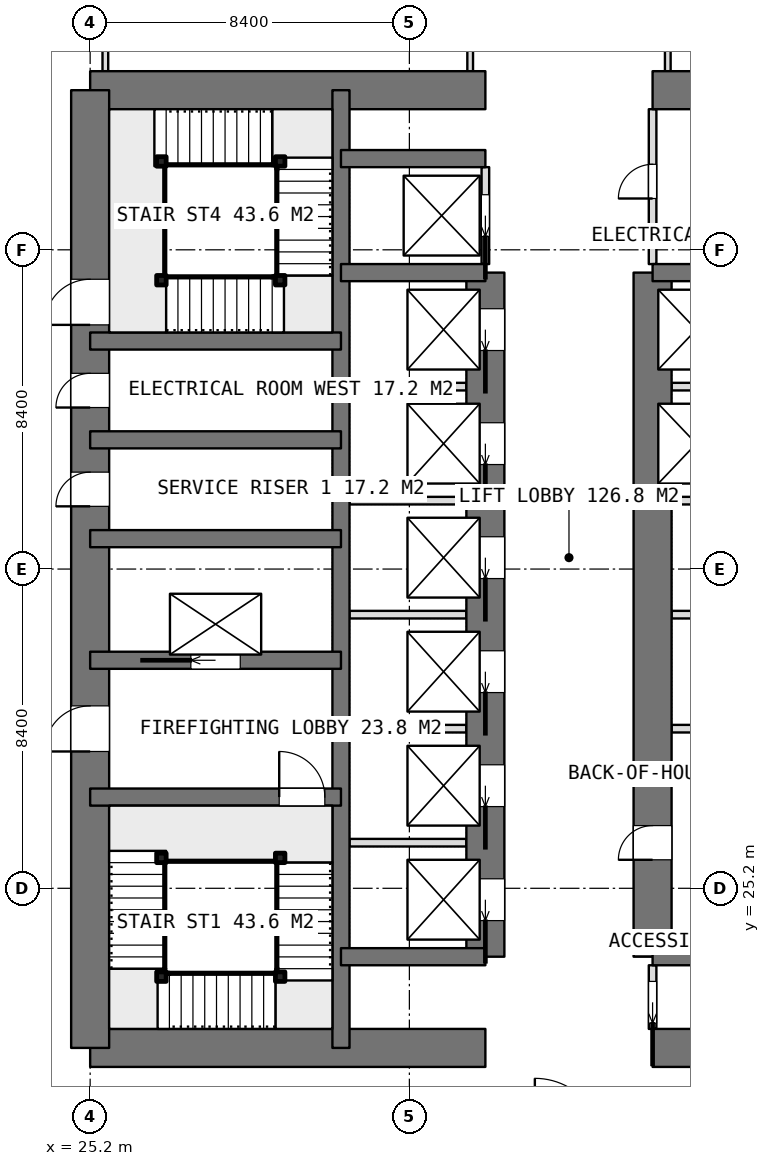
"""IFC4 building model, lengths in metres.
Left out: names, types, materials, properties, quantities, classifications, styles, units other than length and angle.
Written with IfcOpenShell. Run it as: python <this file> out.ifc"""

import sys

from ifc_helpers import new_model, si_unit, direction, frame, frame_2d, origin, origin_2d, place, context, subcontext, project, spatial, rectangle, extrude, element, fill, save


model = new_model("IFC4")
c1 = context("Model", 3, precision=1e-05, world=origin(), true_north=direction((0.0, 1.0)))
c2 = subcontext(c1, "Body", "Model", "MODEL_VIEW")
j1 = project(units=[si_unit("LENGTHUNIT", "METRE"), si_unit("PLANEANGLEUNIT", "RADIAN")], contexts=[c1])
p1 = place(None, origin())
s1 = spatial("IfcSite", under=j1, at=p1, CompositionType="ELEMENT")
p2 = place(p1, origin())
s2 = spatial("IfcBuilding", under=s1, at=p2, CompositionType="ELEMENT")
p3 = place(p2, frame((0.0, 0.0, 172.7)))
s3 = spatial("IfcBuildingStorey", under=s2, at=p3, CompositionType="ELEMENT", Elevation=172.7)
p4 = place(p3, frame((25.2, 21.0, 0.0), z_axis=(0.0, 0.0, 1.0), x_axis=(1.0, 0.0, 0.0)))
e1 = element("IfcWall", 1, at=p4, inside=s3, PredefinedType="SHEAR", context=c2, shape_type="SweptSolid", body=[
    extrude(rectangle(XDim=10.4, YDim=1.0, at=frame_2d((5.2, 0.0))), origin(), (0.0, 0.0, 1.0), 3.75),
])
p5 = place(p3, frame((40.0, 21.0, 0.0), z_axis=(0.0, 0.0, 1.0), x_axis=(1.0, 0.0, 0.0)))
e2 = element("IfcWall", 2, at=p5, inside=s3, PredefinedType="SHEAR", context=c2, shape_type="SweptSolid", body=[
    extrude(rectangle(XDim=10.4, YDim=1.0, at=frame_2d((5.2, 0.0))), origin(), (0.0, 0.0, 1.0), 3.75),
])
p6 = place(p3, frame((25.2, 46.2, 0.0), z_axis=(0.0, 0.0, 1.0), x_axis=(1.0, 0.0, 0.0)))
e3 = element("IfcWall", 3, at=p6, inside=s3, PredefinedType="SHEAR", context=c2, shape_type="SweptSolid", body=[
    extrude(rectangle(XDim=10.4, YDim=1.0, at=frame_2d((5.2, 0.0))), origin(), (0.0, 0.0, 1.0), 3.75),
])
p7 = place(p3, frame((40.0, 46.2, 0.0), z_axis=(0.0, 0.0, 1.0), x_axis=(1.0, 0.0, 0.0)))
e4 = element("IfcWall", 4, at=p7, inside=s3, PredefinedType="SHEAR", context=c2, shape_type="SweptSolid", body=[
    extrude(rectangle(XDim=10.4, YDim=1.0, at=frame_2d((5.2, 0.0))), origin(), (0.0, 0.0, 1.0), 3.75),
])
p8 = place(p3, frame((25.2, 21.0, 0.0), z_axis=(0.0, 0.0, 1.0), x_axis=(0.0, 1.0, 0.0)))
e5 = element("IfcWall", 5, at=p8, inside=s3, PredefinedType="SHEAR", context=c2, shape_type="SweptSolid", body=[
    extrude(rectangle(XDim=25.2, YDim=1.0, at=frame_2d((12.6, 0.0))), origin(), (0.0, 0.0, 1.0), 3.75),
])
p9 = place(p8, frame((7.8, 0.0, 0.0)))
e6 = element("IfcOpeningElement", 6, at=p9, cuts=e5, PredefinedType="OPENING", context=c2, shape_type="SweptSolid", body=[
    extrude(rectangle(XDim=1.2, YDim=2.1, at=frame_2d((0.6, 1.05))), frame((0.0, 0.51, 0.0), z_axis=(0.0, -1.0, 0.0), x_axis=(1.0, 0.0, 0.0)), (0.0, 0.0, 1.0), 1.02),
])
p10 = place(p8, frame((14.25, 0.0, 0.0)))
e7 = element("IfcOpeningElement", 7, at=p10, cuts=e5, PredefinedType="OPENING", context=c2, shape_type="SweptSolid", body=[
    extrude(rectangle(XDim=0.9, YDim=2.1, at=frame_2d((0.45, 1.05))), frame((0.0, 0.51, 0.0), z_axis=(0.0, -1.0, 0.0), x_axis=(1.0, 0.0, 0.0)), (0.0, 0.0, 1.0), 1.02),
])
p11 = place(p8, frame((16.85, 0.0, 0.0)))
e8 = element("IfcOpeningElement", 8, at=p11, cuts=e5, PredefinedType="OPENING", context=c2, shape_type="SweptSolid", body=[
    extrude(rectangle(XDim=0.9, YDim=2.1, at=frame_2d((0.45, 1.05))), frame((0.0, 0.51, 0.0), z_axis=(0.0, -1.0, 0.0), x_axis=(1.0, 0.0, 0.0)), (0.0, 0.0, 1.0), 1.02),
])
p12 = place(p8, frame((19.025, 0.0, 0.0)))
e9 = element("IfcOpeningElement", 9, at=p12, cuts=e5, PredefinedType="OPENING", context=c2, shape_type="SweptSolid", body=[
    extrude(rectangle(XDim=1.2, YDim=2.1, at=frame_2d((0.6, 1.05))), frame((0.0, 0.51, 0.0), z_axis=(0.0, -1.0, 0.0), x_axis=(1.0, 0.0, 0.0)), (0.0, 0.0, 1.0), 1.02),
])
p13 = place(p3, frame((31.8, 21.0, 0.0), z_axis=(0.0, 0.0, 1.0), x_axis=(0.0, 1.0, 0.0)))
e10 = element("IfcWall", 10, at=p13, inside=s3, PredefinedType="SHEAR", context=c2, shape_type="SweptSolid", body=[
    extrude(rectangle(XDim=25.2, YDim=0.45, at=frame_2d((12.6, 0.0))), origin(), (0.0, 0.0, 1.0), 3.75),
])
p14 = place(p3, frame((35.6, 23.4, 0.0), z_axis=(0.0, 0.0, 1.0), x_axis=(0.0, 1.0, 0.0)))
e11 = element("IfcWall", 11, at=p14, inside=s3, PredefinedType="SHEAR", context=c2, shape_type="SweptSolid", body=[
    extrude(rectangle(XDim=18.0, YDim=1.0, at=frame_2d((9.0, 0.0))), origin(), (0.0, 0.0, 1.0), 3.75),
])
p15 = place(p14, frame((0.95, 0.0, 0.0)))
e12 = element("IfcOpeningElement", 12, at=p15, cuts=e11, PredefinedType="OPENING", context=c2, shape_type="SweptSolid", body=[
    extrude(rectangle(XDim=1.1, YDim=2.1, at=frame_2d((0.55, 1.05))), frame((0.0, 0.51, 0.0), z_axis=(0.0, -1.0, 0.0), x_axis=(1.0, 0.0, 0.0)), (0.0, 0.0, 1.0), 1.02),
])
p16 = place(p14, frame((3.95, 0.0, 0.0)))
e13 = element("IfcOpeningElement", 13, at=p16, cuts=e11, PredefinedType="OPENING", context=c2, shape_type="SweptSolid", body=[
    extrude(rectangle(XDim=1.1, YDim=2.1, at=frame_2d((0.55, 1.05))), frame((0.0, 0.51, 0.0), z_axis=(0.0, -1.0, 0.0), x_axis=(1.0, 0.0, 0.0)), (0.0, 0.0, 1.0), 1.02),
])
p17 = place(p14, frame((6.95, 0.0, 0.0)))
e14 = element("IfcOpeningElement", 14, at=p17, cuts=e11, PredefinedType="OPENING", context=c2, shape_type="SweptSolid", body=[
    extrude(rectangle(XDim=1.1, YDim=2.1, at=frame_2d((0.55, 1.05))), frame((0.0, 0.51, 0.0), z_axis=(0.0, -1.0, 0.0), x_axis=(1.0, 0.0, 0.0)), (0.0, 0.0, 1.0), 1.02),
])
p18 = place(p14, frame((9.95, 0.0, 0.0)))
e15 = element("IfcOpeningElement", 15, at=p18, cuts=e11, PredefinedType="OPENING", context=c2, shape_type="SweptSolid", body=[
    extrude(rectangle(XDim=1.1, YDim=2.1, at=frame_2d((0.55, 1.05))), frame((0.0, 0.51, 0.0), z_axis=(0.0, -1.0, 0.0), x_axis=(1.0, 0.0, 0.0)), (0.0, 0.0, 1.0), 1.02),
])
p19 = place(p14, frame((12.95, 0.0, 0.0)))
e16 = element("IfcOpeningElement", 16, at=p19, cuts=e11, PredefinedType="OPENING", context=c2, shape_type="SweptSolid", body=[
    extrude(rectangle(XDim=1.1, YDim=2.1, at=frame_2d((0.55, 1.05))), frame((0.0, 0.51, 0.0), z_axis=(0.0, -1.0, 0.0), x_axis=(1.0, 0.0, 0.0)), (0.0, 0.0, 1.0), 1.02),
])
p20 = place(p14, frame((15.95, 0.0, 0.0)))
e17 = element("IfcOpeningElement", 17, at=p20, cuts=e11, PredefinedType="OPENING", context=c2, shape_type="SweptSolid", body=[
    extrude(rectangle(XDim=1.1, YDim=2.1, at=frame_2d((0.55, 1.05))), frame((0.0, 0.51, 0.0), z_axis=(0.0, -1.0, 0.0), x_axis=(1.0, 0.0, 0.0)), (0.0, 0.0, 1.0), 1.02),
])
p21 = place(p3, frame((40.0, 23.4, 0.0), z_axis=(0.0, 0.0, 1.0), x_axis=(0.0, 1.0, 0.0)))
e18 = element("IfcWall", 18, at=p21, inside=s3, PredefinedType="SHEAR", context=c2, shape_type="SweptSolid", body=[
    extrude(rectangle(XDim=18.0, YDim=1.0, at=frame_2d((9.0, 0.0))), origin(), (0.0, 0.0, 1.0), 3.75),
])
p22 = place(p21, frame((2.55, 0.0, 0.0)))
e19 = element("IfcOpeningElement", 19, at=p22, cuts=e18, PredefinedType="OPENING", context=c2, shape_type="SweptSolid", body=[
    extrude(rectangle(XDim=0.9, YDim=2.1, at=frame_2d((0.45, 1.05))), frame((0.0, 0.51, 0.0), z_axis=(0.0, -1.0, 0.0), x_axis=(1.0, 0.0, 0.0)), (0.0, 0.0, 1.0), 1.02),
])
for number, where, z_axis, x_axis in (
    (20, (31.8, 23.4, 0.0), (0.0, 0.0, 1.0), (1.0, 0.0, 0.0)),
    (21, (31.8, 41.4, 0.0), (0.0, 0.0, 1.0), (1.0, 0.0, 0.0)),
    (22, (31.8, 44.4, 0.0), (0.0, 0.0, 1.0), (1.0, 0.0, 0.0)),
    (23, (40.0, 23.4, 0.0), (0.0, 0.0, 1.0), (1.0, 0.0, 0.0)),
    (24, (40.0, 41.4, 0.0), (0.0, 0.0, 1.0), (1.0, 0.0, 0.0)),
):
    element("IfcWall", number, at=place(p3, frame(where, z_axis=z_axis, x_axis=x_axis)), inside=s3, PredefinedType="SHEAR", context=c2, shape_type="SweptSolid", body=[
        extrude(rectangle(XDim=3.8, YDim=0.45, at=frame_2d((1.9, 0.0))), origin(), (0.0, 0.0, 1.0), 3.75),
    ])
p23 = place(p3, frame((25.2, 27.6, 0.0), z_axis=(0.0, 0.0, 1.0), x_axis=(1.0, 0.0, 0.0)))
e25 = element("IfcWall", 25, at=p23, inside=s3, PredefinedType="SHEAR", context=c2, shape_type="SweptSolid", body=[
    extrude(rectangle(XDim=6.6, YDim=0.45, at=frame_2d((3.3, 0.0))), origin(), (0.0, 0.0, 1.0), 3.75),
])
p24 = place(p23, frame((4.975, 0.0, 0.0)))
e26 = element("IfcOpeningElement", 26, at=p24, cuts=e25, PredefinedType="OPENING", context=c2, shape_type="SweptSolid", body=[
    extrude(rectangle(XDim=1.2, YDim=2.1, at=frame_2d((0.6, 1.05))), frame((0.0, 0.235, 0.0), z_axis=(0.0, -1.0, 0.0), x_axis=(1.0, 0.0, 0.0)), (0.0, 0.0, 1.0), 0.47),
])
p25 = place(p3, frame((25.2, 31.2, 0.0), z_axis=(0.0, 0.0, 1.0), x_axis=(1.0, 0.0, 0.0)))
e27 = element("IfcWall", 27, at=p25, inside=s3, PredefinedType="SHEAR", context=c2, shape_type="SweptSolid", body=[
    extrude(rectangle(XDim=6.6, YDim=0.45, at=frame_2d((3.3, 0.0))), origin(), (0.0, 0.0, 1.0), 3.75),
])
p26 = place(p25, frame((2.65, 0.0, 0.0)))
e28 = element("IfcOpeningElement", 28, at=p26, cuts=e27, PredefinedType="OPENING", context=c2, shape_type="SweptSolid", body=[
    extrude(rectangle(XDim=1.3, YDim=2.1, at=frame_2d((0.65, 1.05))), frame((0.0, 0.235, 0.0), z_axis=(0.0, -1.0, 0.0), x_axis=(1.0, 0.0, 0.0)), (0.0, 0.0, 1.0), 0.47),
])
for number, where, z_axis, x_axis in (
    (29, (25.2, 34.4, 0.0), (0.0, 0.0, 1.0), (1.0, 0.0, 0.0)),
    (30, (25.2, 37.0, 0.0), (0.0, 0.0, 1.0), (1.0, 0.0, 0.0)),
    (31, (25.2, 39.6, 0.0), (0.0, 0.0, 1.0), (1.0, 0.0, 0.0)),
):
    element("IfcWall", number, at=place(p3, frame(where, z_axis=z_axis, x_axis=x_axis)), inside=s3, PredefinedType="SHEAR", context=c2, shape_type="SweptSolid", body=[
        extrude(rectangle(XDim=6.6, YDim=0.45, at=frame_2d((3.3, 0.0))), origin(), (0.0, 0.0, 1.0), 3.75),
    ])
for number, where, z_axis, x_axis in (
    (32, (32.025, 26.4, 0.0), (0.0, 0.0, 1.0), (1.0, 0.0, 0.0)),
    (33, (32.025, 29.4, 0.0), (0.0, 0.0, 1.0), (1.0, 0.0, 0.0)),
    (34, (32.025, 32.4, 0.0), (0.0, 0.0, 1.0), (1.0, 0.0, 0.0)),
    (35, (32.025, 35.4, 0.0), (0.0, 0.0, 1.0), (1.0, 0.0, 0.0)),
    (36, (32.025, 38.4, 0.0), (0.0, 0.0, 1.0), (1.0, 0.0, 0.0)),
):
    element("IfcWall", number, at=place(p3, frame(where, z_axis=z_axis, x_axis=x_axis)), inside=s3, PredefinedType="PARTITIONING", context=c2, shape_type="SweptSolid", body=[
        extrude(rectangle(XDim=3.075, YDim=0.2, at=frame_2d((1.538, 0.0))), origin(), (0.0, 0.0, 1.0), 3.5),
    ])
for number, where, z_axis, x_axis in (
    (37, (40.5, 29.4, 0.0), (0.0, 0.0, 1.0), (1.0, 0.0, 0.0)),
    (38, (40.5, 32.4, 0.0), (0.0, 0.0, 1.0), (1.0, 0.0, 0.0)),
    (39, (40.5, 35.4, 0.0), (0.0, 0.0, 1.0), (1.0, 0.0, 0.0)),
    (40, (40.5, 38.4, 0.0), (0.0, 0.0, 1.0), (1.0, 0.0, 0.0)),
):
    element("IfcWall", number, at=place(p3, frame(where, z_axis=z_axis, x_axis=x_axis)), inside=s3, PredefinedType="PARTITIONING", context=c2, shape_type="SweptSolid", body=[
        extrude(rectangle(XDim=3.075, YDim=0.2, at=frame_2d((1.538, 0.0))), origin(), (0.0, 0.0, 1.0), 3.5),
    ])
p27 = place(p3, frame((40.0, 21.5, 0.0), z_axis=(0.0, 0.0, 1.0), x_axis=(0.0, 1.0, 0.0)))
e41 = element("IfcWall", 41, at=p27, inside=s3, PredefinedType="PARTITIONING", context=c2, shape_type="SweptSolid", body=[
    extrude(rectangle(XDim=1.675, YDim=0.2, at=frame_2d((0.837, 0.0))), origin(), (0.0, 0.0, 1.0), 3.5),
])
p28 = place(p27, frame((0.15, 0.0, 0.0)))
e42 = element("IfcOpeningElement", 42, at=p28, cuts=e41, PredefinedType="OPENING", context=c2, shape_type="SweptSolid", body=[
    extrude(rectangle(XDim=1.1, YDim=2.1, at=frame_2d((0.55, 1.05))), frame((0.0, 0.11, 0.0), z_axis=(0.0, -1.0, 0.0), x_axis=(1.0, 0.0, 0.0)), (0.0, 0.0, 1.0), 0.22),
])
p29 = place(p3, frame((40.0, 41.625, 0.0), z_axis=(0.0, 0.0, 1.0), x_axis=(0.0, 1.0, 0.0)))
e43 = element("IfcWall", 43, at=p29, inside=s3, PredefinedType="PARTITIONING", context=c2, shape_type="SweptSolid", body=[
    extrude(rectangle(XDim=4.075, YDim=0.2, at=frame_2d((2.038, 0.0))), origin(), (0.0, 0.0, 1.0), 3.5),
])
p30 = place(p29, frame((1.725, 0.0, 0.0)))
e44 = element("IfcOpeningElement", 44, at=p30, cuts=e43, PredefinedType="OPENING", context=c2, shape_type="SweptSolid", body=[
    extrude(rectangle(XDim=0.9, YDim=2.1, at=frame_2d((0.45, 1.05))), frame((0.0, 0.11, 0.0), z_axis=(0.0, -1.0, 0.0), x_axis=(1.0, 0.0, 0.0)), (0.0, 0.0, 1.0), 0.22),
])
p31 = place(p3, frame((35.6, 41.625, 0.0), z_axis=(0.0, 0.0, 1.0), x_axis=(0.0, 1.0, 0.0)))
e45 = element("IfcWall", 45, at=p31, inside=s3, PredefinedType="PARTITIONING", context=c2, shape_type="SweptSolid", body=[
    extrude(rectangle(XDim=2.55, YDim=0.2, at=frame_2d((1.275, 0.0))), origin(), (0.0, 0.0, 1.0), 3.5),
])
p32 = place(p31, frame((0.725, 0.0, 0.0)))
e46 = element("IfcOpeningElement", 46, at=p32, cuts=e45, PredefinedType="OPENING", context=c2, shape_type="SweptSolid", body=[
    extrude(rectangle(XDim=1.1, YDim=2.1, at=frame_2d((0.55, 1.05))), frame((0.0, 0.11, 0.0), z_axis=(0.0, -1.0, 0.0), x_axis=(1.0, 0.0, 0.0)), (0.0, 0.0, 1.0), 0.22),
])
for number, where, z_axis, x_axis in (
    (47, (40.4, 46.7, 0.0), (0.0, 0.0, 1.0), (0.0, 1.0, 0.0)),
    (48, (25.6, 46.7, 0.0), (0.0, 0.0, 1.0), (0.0, 1.0, 0.0)),
    (49, (35.2, 46.7, 0.0), (0.0, 0.0, 1.0), (0.0, 1.0, 0.0)),
):
    element("IfcWall", number, at=place(p3, frame(where, z_axis=z_axis, x_axis=x_axis)), inside=s3, PredefinedType="PARTITIONING", context=c2, shape_type="SweptSolid", body=[
        extrude(rectangle(XDim=2.625, YDim=0.15, at=frame_2d((1.312, 0.0))), origin(), (0.0, 0.0, 1.0), 3.5),
    ])
for number, where, z_axis, x_axis in (
    (50, (30.2, 26.0, 0.0), (0.0, 0.0, 1.0), (1.0, 0.0, 0.0)),
    (51, (30.2, 22.875, 0.0), (0.0, 0.0, 1.0), (1.0, 0.0, 0.0)),
    (52, (27.075, 22.875, 0.0), (0.0, 0.0, 1.0), (1.0, 0.0, 0.0)),
    (53, (27.075, 26.0, 0.0), (0.0, 0.0, 1.0), (1.0, 0.0, 0.0)),
    (54, (27.075, 41.2, 0.0), (0.0, 0.0, 1.0), (1.0, 0.0, 0.0)),
    (55, (30.2, 41.2, 0.0), (0.0, 0.0, 1.0), (1.0, 0.0, 0.0)),
    (56, (30.2, 44.325, 0.0), (0.0, 0.0, 1.0), (1.0, 0.0, 0.0)),
    (57, (27.075, 44.325, 0.0), (0.0, 0.0, 1.0), (1.0, 0.0, 0.0)),
):
    element("IfcColumn", number, at=place(p3, frame(where, z_axis=z_axis, x_axis=x_axis)), inside=s3, PredefinedType="COLUMN", context=c2, shape_type="SweptSolid", body=[
        extrude(rectangle(XDim=0.25, YDim=0.25, at=origin_2d()), origin(), (0.0, 0.0, 1.0), 3.75),
    ])
p33 = place(p9, origin())
e58 = element("IfcDoor", 58, at=p33, inside=s3, OperationType="SINGLE_SWING_LEFT", PredefinedType="DOOR", context=c2, shape_type="SweptSolid", body=[
    extrude(rectangle(XDim=1.2, YDim=2.1, at=frame_2d((0.6, 1.05))), frame((0.0, 0.025, 0.0), z_axis=(0.0, -1.0, 0.0), x_axis=(1.0, 0.0, 0.0)), (0.0, 0.0, 1.0), 0.05),
])
fill(e6, e58)
p34 = place(p10, origin())
e59 = element("IfcDoor", 59, at=p34, inside=s3, OperationType="SINGLE_SWING_LEFT", PredefinedType="DOOR", context=c2, shape_type="SweptSolid", body=[
    extrude(rectangle(XDim=0.9, YDim=2.1, at=frame_2d((0.45, 1.05))), frame((0.0, 0.025, 0.0), z_axis=(0.0, -1.0, 0.0), x_axis=(1.0, 0.0, 0.0)), (0.0, 0.0, 1.0), 0.05),
])
fill(e7, e59)
p35 = place(p11, origin())
e60 = element("IfcDoor", 60, at=p35, inside=s3, OperationType="SINGLE_SWING_LEFT", PredefinedType="DOOR", context=c2, shape_type="SweptSolid", body=[
    extrude(rectangle(XDim=0.9, YDim=2.1, at=frame_2d((0.45, 1.05))), frame((0.0, 0.025, 0.0), z_axis=(0.0, -1.0, 0.0), x_axis=(1.0, 0.0, 0.0)), (0.0, 0.0, 1.0), 0.05),
])
fill(e8, e60)
p36 = place(p28, origin())
e61 = element("IfcDoor", 61, at=p36, inside=s3, OperationType="SLIDING_TO_LEFT", PredefinedType="DOOR", context=c2, shape_type="SweptSolid", body=[
    extrude(rectangle(XDim=1.1, YDim=2.1, at=frame_2d((0.55, 1.05))), frame((0.0, 0.025, 0.0), z_axis=(0.0, -1.0, 0.0), x_axis=(1.0, 0.0, 0.0)), (0.0, 0.0, 1.0), 0.05),
])
fill(e42, e61)
p37 = place(p30, origin())
e62 = element("IfcDoor", 62, at=p37, inside=s3, OperationType="SINGLE_SWING_LEFT", PredefinedType="DOOR", context=c2, shape_type="SweptSolid", body=[
    extrude(rectangle(XDim=0.9, YDim=2.1, at=frame_2d((0.45, 1.05))), frame((0.0, 0.025, 0.0), z_axis=(0.0, -1.0, 0.0), x_axis=(1.0, 0.0, 0.0)), (0.0, 0.0, 1.0), 0.05),
])
fill(e44, e62)
p38 = place(p22, origin())
e63 = element("IfcDoor", 63, at=p38, inside=s3, OperationType="SINGLE_SWING_LEFT", PredefinedType="DOOR", context=c2, shape_type="SweptSolid", body=[
    extrude(rectangle(XDim=0.9, YDim=2.1, at=frame_2d((0.45, 1.05))), frame((0.0, 0.025, 0.0), z_axis=(0.0, -1.0, 0.0), x_axis=(1.0, 0.0, 0.0)), (0.0, 0.0, 1.0), 0.05),
])
fill(e19, e63)
p39 = place(p15, origin())
e64 = element("IfcDoor", 64, at=p39, inside=s3, OperationType="SLIDING_TO_LEFT", PredefinedType="USERDEFINED", context=c2, shape_type="SweptSolid", body=[
    extrude(rectangle(XDim=1.1, YDim=2.1, at=frame_2d((0.55, 1.05))), frame((0.0, 0.025, 0.0), z_axis=(0.0, -1.0, 0.0), x_axis=(1.0, 0.0, 0.0)), (0.0, 0.0, 1.0), 0.05),
])
fill(e12, e64)
p40 = place(p16, origin())
e65 = element("IfcDoor", 65, at=p40, inside=s3, OperationType="SLIDING_TO_LEFT", PredefinedType="USERDEFINED", context=c2, shape_type="SweptSolid", body=[
    extrude(rectangle(XDim=1.1, YDim=2.1, at=frame_2d((0.55, 1.05))), frame((0.0, 0.025, 0.0), z_axis=(0.0, -1.0, 0.0), x_axis=(1.0, 0.0, 0.0)), (0.0, 0.0, 1.0), 0.05),
])
fill(e13, e65)
p41 = place(p17, origin())
e66 = element("IfcDoor", 66, at=p41, inside=s3, OperationType="SLIDING_TO_LEFT", PredefinedType="USERDEFINED", context=c2, shape_type="SweptSolid", body=[
    extrude(rectangle(XDim=1.1, YDim=2.1, at=frame_2d((0.55, 1.05))), frame((0.0, 0.025, 0.0), z_axis=(0.0, -1.0, 0.0), x_axis=(1.0, 0.0, 0.0)), (0.0, 0.0, 1.0), 0.05),
])
fill(e14, e66)
p42 = place(p18, origin())
e67 = element("IfcDoor", 67, at=p42, inside=s3, OperationType="SLIDING_TO_LEFT", PredefinedType="USERDEFINED", context=c2, shape_type="SweptSolid", body=[
    extrude(rectangle(XDim=1.1, YDim=2.1, at=frame_2d((0.55, 1.05))), frame((0.0, 0.025, 0.0), z_axis=(0.0, -1.0, 0.0), x_axis=(1.0, 0.0, 0.0)), (0.0, 0.0, 1.0), 0.05),
])
fill(e15, e67)
p43 = place(p19, origin())
e68 = element("IfcDoor", 68, at=p43, inside=s3, OperationType="SLIDING_TO_LEFT", PredefinedType="USERDEFINED", context=c2, shape_type="SweptSolid", body=[
    extrude(rectangle(XDim=1.1, YDim=2.1, at=frame_2d((0.55, 1.05))), frame((0.0, 0.025, 0.0), z_axis=(0.0, -1.0, 0.0), x_axis=(1.0, 0.0, 0.0)), (0.0, 0.0, 1.0), 0.05),
])
fill(e16, e68)
p44 = place(p20, origin())
e69 = element("IfcDoor", 69, at=p44, inside=s3, OperationType="SLIDING_TO_LEFT", PredefinedType="USERDEFINED", context=c2, shape_type="SweptSolid", body=[
    extrude(rectangle(XDim=1.1, YDim=2.1, at=frame_2d((0.55, 1.05))), frame((0.0, 0.025, 0.0), z_axis=(0.0, -1.0, 0.0), x_axis=(1.0, 0.0, 0.0)), (0.0, 0.0, 1.0), 0.05),
])
fill(e17, e69)
p45 = place(p26, origin())
e70 = element("IfcDoor", 70, at=p45, inside=s3, OperationType="SLIDING_TO_LEFT", PredefinedType="USERDEFINED", context=c2, shape_type="SweptSolid", body=[
    extrude(rectangle(XDim=1.3, YDim=2.1, at=frame_2d((0.65, 1.05))), frame((0.0, 0.025, 0.0), z_axis=(0.0, -1.0, 0.0), x_axis=(1.0, 0.0, 0.0)), (0.0, 0.0, 1.0), 0.05),
])
fill(e28, e70)
p46 = place(p32, origin())
e71 = element("IfcDoor", 71, at=p46, inside=s3, OperationType="SLIDING_TO_LEFT", PredefinedType="USERDEFINED", context=c2, shape_type="SweptSolid", body=[
    extrude(rectangle(XDim=1.1, YDim=2.1, at=frame_2d((0.55, 1.05))), frame((0.0, 0.025, 0.0), z_axis=(0.0, -1.0, 0.0), x_axis=(1.0, 0.0, 0.0)), (0.0, 0.0, 1.0), 0.05),
])
fill(e46, e71)
p47 = place(p24, origin())
e72 = element("IfcDoor", 72, at=p47, inside=s3, OperationType="SINGLE_SWING_RIGHT", PredefinedType="DOOR", context=c2, shape_type="SweptSolid", body=[
    extrude(rectangle(XDim=1.2, YDim=2.1, at=frame_2d((0.6, 1.05))), frame((0.0, 0.025, 0.0), z_axis=(0.0, -1.0, 0.0), x_axis=(1.0, 0.0, 0.0)), (0.0, 0.0, 1.0), 0.05),
])
fill(e26, e72)
p48 = place(p12, origin())
e73 = element("IfcDoor", 73, at=p48, inside=s3, OperationType="SINGLE_SWING_RIGHT", PredefinedType="DOOR", context=c2, shape_type="SweptSolid", body=[
    extrude(rectangle(XDim=1.2, YDim=2.1, at=frame_2d((0.6, 1.05))), frame((0.0, 0.025, 0.0), z_axis=(0.0, -1.0, 0.0), x_axis=(1.0, 0.0, 0.0)), (0.0, 0.0, 1.0), 0.05),
])
fill(e9, e73)
save(model, sys.argv[1])
